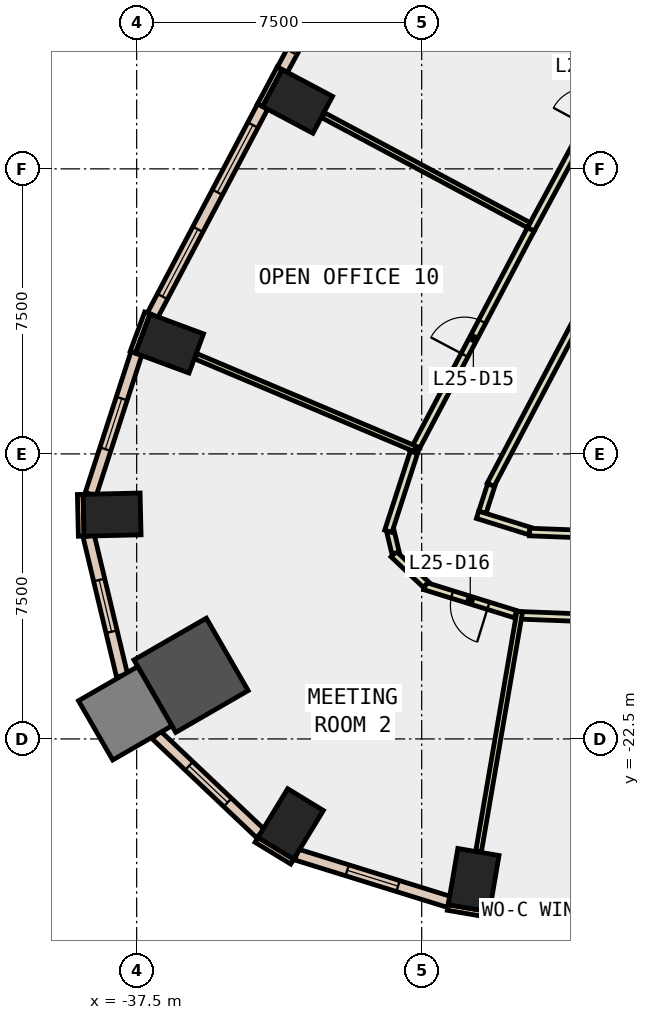
"""IFC4 building model, lengths in metres.
Left out: names, types, materials, properties, quantities, classifications, styles, units other than length and angle.
Written with IfcOpenShell. Run it as: python <this file> out.ifc"""

import sys

from ifc_helpers import new_model, si_unit, direction, frame, frame_2d, origin, origin_2d, place, context, subcontext, project, spatial, rectangle, extrude, element, fill, save


model = new_model("IFC4")
c1 = context("Model", 3, precision=1e-05, world=origin(), true_north=direction((0.0, 1.0)))
c2 = subcontext(c1, "Body", "Model", "MODEL_VIEW")
j1 = project(units=[si_unit("LENGTHUNIT", "METRE"), si_unit("PLANEANGLEUNIT", "RADIAN")], contexts=[c1])
p1 = place(None, origin())
s1 = spatial("IfcSite", under=j1, at=p1, CompositionType="ELEMENT")
p2 = place(p1, origin())
s2 = spatial("IfcBuilding", under=s1, at=p2, CompositionType="ELEMENT")
p3 = place(p2, frame((0.0, 0.0, 116.0)))
s3 = spatial("IfcBuildingStorey", under=s2, at=p3, CompositionType="ELEMENT", Elevation=116.0)
for number, where, z_axis, x_axis in (
    (1, (-28.633, -26.214, -0.4), (0.0, 0.0, 1.0), (-0.986, 0.168, 0.0)),
    (2, (-33.266, -5.726, -0.4), (0.0, 0.0, 1.0), (0.469, 0.883, 0.0)),
    (3, (-36.635, -12.096, -0.4), (0.0, 0.0, 1.0), (0.347, 0.938, 0.0)),
    (4, (-38.147, -16.597, -0.4), (0.0, 0.0, 1.0), (-0.023, 1.0, 0.0)),
):
    element("IfcColumn", number, at=place(p3, frame(where, z_axis=z_axis, x_axis=x_axis)), inside=s3, PredefinedType="COLUMN", context=c2, shape_type="SweptSolid", body=[
        extrude(rectangle(XDim=1.1, YDim=1.5, at=origin_2d()), origin(), (0.0, 0.0, 1.0), 4.2),
    ])
p4 = place(p3, frame((-36.069, -20.825, -0.4), z_axis=(0.0, 0.0, 1.0), x_axis=(0.866025403784, 0.5, 0.0)))
e5 = element("IfcColumn", 5, at=p4, inside=s3, PredefinedType="COLUMN", context=c2, shape_type="SweptSolid", body=[
    extrude(rectangle(XDim=2.2, YDim=2.2, at=origin_2d()), origin(), (0.0, 0.0, 1.0), 4.2),
])
p5 = place(p3, frame((-33.447, -24.737, -0.4), z_axis=(0.0, 0.0, 1.0), x_axis=(-0.854095929175, 0.520115510024, 0.0)))
e6 = element("IfcColumn", 6, at=p5, inside=s3, PredefinedType="COLUMN", context=c2, shape_type="SweptSolid", body=[
    extrude(rectangle(XDim=1.1, YDim=1.5, at=origin_2d()), origin(), (0.0, 0.0, 1.0), 4.2),
])
p6 = place(p3, frame((-37.801, -21.825, -0.4), z_axis=(0.0, 0.0, 1.0), x_axis=(0.866025403784, 0.5, 0.0)))
e7 = element("IfcColumn", 7, at=p6, inside=s3, PredefinedType="COLUMN", context=c2, shape_type="SweptSolid", body=[
    extrude(rectangle(XDim=1.8, YDim=1.8, at=origin_2d()), origin(), (0.0, 0.0, 1.0), 4.2),
])
p7 = place(p3, frame((-33.737, -4.854, 0.0), z_axis=(0.0, 0.0, 1.0), x_axis=(-0.46919310775, -0.883095593716, 0.0)))
e8 = element("IfcWall", 8, at=p7, inside=s3, PredefinedType="STANDARD", context=c2, shape_type="SweptSolid", body=[
    extrude(rectangle(XDim=1.099, YDim=0.15, at=frame_2d((0.55, 0.0))), origin(), (0.0, 0.0, 1.0), 3.8),
])
p8 = place(p3, frame((-37.218, -11.293, 0.0), z_axis=(0.0, 0.0, 1.0), x_axis=(-0.347205967468, -0.937788897436, 0.0)))
e9 = element("IfcWall", 9, at=p8, inside=s3, PredefinedType="STANDARD", context=c2, shape_type="SweptSolid", body=[
    extrude(rectangle(XDim=1.1, YDim=0.15, at=frame_2d((0.55, 0.0))), origin(), (0.0, 0.0, 1.0), 3.8),
])
p9 = place(p3, frame((-29.314, -26.935, 0.0), z_axis=(0.0, 0.0, 1.0), x_axis=(0.985763338892, -0.168138751323, 0.0)))
e10 = element("IfcWall", 10, at=p9, inside=s3, PredefinedType="STANDARD", context=c2, shape_type="SweptSolid", body=[
    extrude(rectangle(XDim=1.101, YDim=0.15, at=frame_2d((0.55, 0.0))), origin(), (0.0, 0.0, 1.0), 3.8),
])
for number, where, z_axis, x_axis in (
    (11, (-38.985, -16.066, 0.0), (0.0, 0.0, 1.0), (0.024, -1.0, 0.0)),
    (12, (-34.346, -25.156, 0.0), (0.0, 0.0, 1.0), (0.854, -0.52, 0.0)),
):
    element("IfcWall", number, at=place(p3, frame(where, z_axis=z_axis, x_axis=x_axis)), inside=s3, PredefinedType="STANDARD", context=c2, shape_type="SweptSolid", body=[
        extrude(rectangle(XDim=1.1, YDim=0.15, at=frame_2d((0.55, 0.0))), origin(), (0.0, 0.0, 1.0), 3.8),
    ])
p10 = place(p3, frame((-28.205, -26.973, 0.0), z_axis=(0.0, 0.0, 1.0), x_axis=(0.999266319694, -0.03829911651, 0.0)))
e13 = element("IfcWall", 13, at=p10, inside=s3, PredefinedType="STANDARD", context=c2, shape_type="SweptSolid", body=[
    extrude(rectangle(XDim=5.877, YDim=0.3, at=frame_2d((2.939, 0.0))), origin(), (0.0, 0.0, 1.0), 3.8),
])
p11 = place(p10, frame((0.469, 0.0, 0.9)))
e14 = element("IfcOpeningElement", 14, at=p11, cuts=e13, PredefinedType="OPENING", context=c2, shape_type="SweptSolid", body=[
    extrude(rectangle(XDim=2.0, YDim=2.6, at=frame_2d((1.0, 1.3))), frame((0.0, 0.16, 0.0), z_axis=(0.0, -1.0, 0.0), x_axis=(1.0, 0.0, 0.0)), (0.0, 0.0, 1.0), 0.32),
])
p12 = place(p10, frame((3.408, 0.0, 0.9)))
e15 = element("IfcOpeningElement", 15, at=p12, cuts=e13, PredefinedType="OPENING", context=c2, shape_type="SweptSolid", body=[
    extrude(rectangle(XDim=2.0, YDim=2.6, at=frame_2d((1.0, 1.3))), frame((0.0, 0.16, 0.0), z_axis=(0.0, -1.0, 0.0), x_axis=(1.0, 0.0, 0.0)), (0.0, 0.0, 1.0), 0.32),
])
p13 = place(p3, frame((-30.758, 0.481, 0.0), z_axis=(0.0, 0.0, 1.0), x_axis=(-0.476097776444, -0.879392351152, 0.0)))
e16 = element("IfcWall", 16, at=p13, inside=s3, PredefinedType="STANDARD", context=c2, shape_type="SweptSolid", body=[
    extrude(rectangle(XDim=6.11, YDim=0.3, at=frame_2d((3.055, 0.0))), origin(), (0.0, 0.0, 1.0), 3.8),
])
p14 = place(p13, frame((0.527, 0.0, 0.9)))
e17 = element("IfcOpeningElement", 17, at=p14, cuts=e16, PredefinedType="OPENING", context=c2, shape_type="SweptSolid", body=[
    extrude(rectangle(XDim=2.0, YDim=2.6, at=frame_2d((1.0, 1.3))), frame((0.0, 0.16, 0.0), z_axis=(0.0, -1.0, 0.0), x_axis=(1.0, 0.0, 0.0)), (0.0, 0.0, 1.0), 0.32),
])
p15 = place(p13, frame((3.582, 0.0, 0.9)))
e18 = element("IfcOpeningElement", 18, at=p15, cuts=e16, PredefinedType="OPENING", context=c2, shape_type="SweptSolid", body=[
    extrude(rectangle(XDim=2.0, YDim=2.6, at=frame_2d((1.0, 1.3))), frame((0.0, 0.16, 0.0), z_axis=(0.0, -1.0, 0.0), x_axis=(1.0, 0.0, 0.0)), (0.0, 0.0, 1.0), 0.32),
])
p16 = place(p3, frame((-34.185, -5.86, 0.0), z_axis=(0.0, 0.0, 1.0), x_axis=(-0.466599547852, -0.88446868907, 0.0)))
e19 = element("IfcWall", 19, at=p16, inside=s3, PredefinedType="STANDARD", context=c2, shape_type="SweptSolid", body=[
    extrude(rectangle(XDim=6.202, YDim=0.3, at=frame_2d((3.101, 0.0))), origin(), (0.0, 0.0, 1.0), 3.8),
])
p17 = place(p16, frame((0.551, 0.0, 0.9)))
e20 = element("IfcOpeningElement", 20, at=p17, cuts=e19, PredefinedType="OPENING", context=c2, shape_type="SweptSolid", body=[
    extrude(rectangle(XDim=2.0, YDim=2.6, at=frame_2d((1.0, 1.3))), frame((0.0, 0.16, 0.0), z_axis=(0.0, -1.0, 0.0), x_axis=(1.0, 0.0, 0.0)), (0.0, 0.0, 1.0), 0.32),
])
p18 = place(p16, frame((3.652, 0.0, 0.9)))
e21 = element("IfcOpeningElement", 21, at=p18, cuts=e19, PredefinedType="OPENING", context=c2, shape_type="SweptSolid", body=[
    extrude(rectangle(XDim=2.0, YDim=2.6, at=frame_2d((1.0, 1.3))), frame((0.0, 0.16, 0.0), z_axis=(0.0, -1.0, 0.0), x_axis=(1.0, 0.0, 0.0)), (0.0, 0.0, 1.0), 0.32),
])
p19 = place(p3, frame((-37.508, -12.358, 0.0), z_axis=(0.0, 0.0, 1.0), x_axis=(-0.308484760821, -0.951229284842, 0.0)))
e22 = element("IfcWall", 22, at=p19, inside=s3, PredefinedType="STANDARD", context=c2, shape_type="SweptSolid", body=[
    extrude(rectangle(XDim=3.893, YDim=0.3, at=frame_2d((1.947, 0.0))), origin(), (0.0, 0.0, 1.0), 3.8),
])
p20 = place(p19, frame((1.246, 0.0, 0.9)))
e23 = element("IfcOpeningElement", 23, at=p20, cuts=e22, PredefinedType="OPENING", context=c2, shape_type="SweptSolid", body=[
    extrude(rectangle(XDim=1.4, YDim=2.6, at=frame_2d((0.7, 1.3))), frame((0.0, 0.16, 0.0), z_axis=(0.0, -1.0, 0.0), x_axis=(1.0, 0.0, 0.0)), (0.0, 0.0, 1.0), 0.32),
])
p21 = place(p3, frame((-38.763, -17.161, 0.0), z_axis=(0.0, 0.0, 1.0), x_axis=(0.232654276823, -0.972559503309, 0.0)))
e24 = element("IfcWall", 24, at=p21, inside=s3, PredefinedType="STANDARD", context=c2, shape_type="SweptSolid", body=[
    extrude(rectangle(XDim=3.778, YDim=0.3, at=frame_2d((1.889, 0.0))), origin(), (0.0, 0.0, 1.0), 3.8),
])
p22 = place(p21, frame((1.189, 0.0, 0.9)))
e25 = element("IfcOpeningElement", 25, at=p22, cuts=e24, PredefinedType="OPENING", context=c2, shape_type="SweptSolid", body=[
    extrude(rectangle(XDim=1.4, YDim=2.6, at=frame_2d((0.7, 1.3))), frame((0.0, 0.16, 0.0), z_axis=(0.0, -1.0, 0.0), x_axis=(1.0, 0.0, 0.0)), (0.0, 0.0, 1.0), 0.32),
])
p23 = place(p3, frame((-36.985, -22.392, 0.0), z_axis=(0.0, 0.0, 1.0), x_axis=(0.726076674532, -0.687613745281, 0.0)))
e26 = element("IfcWall", 26, at=p23, inside=s3, PredefinedType="STANDARD", context=c2, shape_type="SweptSolid", body=[
    extrude(rectangle(XDim=3.777, YDim=0.3, at=frame_2d((1.888, 0.0))), origin(), (0.0, 0.0, 1.0), 3.8),
])
p24 = place(p23, frame((1.188, 0.0, 0.9)))
e27 = element("IfcOpeningElement", 27, at=p24, cuts=e26, PredefinedType="OPENING", context=c2, shape_type="SweptSolid", body=[
    extrude(rectangle(XDim=1.4, YDim=2.6, at=frame_2d((0.7, 1.3))), frame((0.0, 0.16, 0.0), z_axis=(0.0, -1.0, 0.0), x_axis=(1.0, 0.0, 0.0)), (0.0, 0.0, 1.0), 0.32),
])
p25 = place(p3, frame((-33.294, -25.542, 0.0), z_axis=(0.0, 0.0, 1.0), x_axis=(0.954955020021, -0.296750585066, 0.0)))
e28 = element("IfcWall", 28, at=p25, inside=s3, PredefinedType="STANDARD", context=c2, shape_type="SweptSolid", body=[
    extrude(rectangle(XDim=4.196, YDim=0.3, at=frame_2d((2.098, 0.0))), origin(), (0.0, 0.0, 1.0), 3.8),
])
p26 = place(p25, frame((1.398, 0.0, 0.9)))
e29 = element("IfcOpeningElement", 29, at=p26, cuts=e28, PredefinedType="OPENING", context=c2, shape_type="SweptSolid", body=[
    extrude(rectangle(XDim=1.4, YDim=2.6, at=frame_2d((0.7, 1.3))), frame((0.0, 0.16, 0.0), z_axis=(0.0, -1.0, 0.0), x_axis=(1.0, 0.0, 0.0)), (0.0, 0.0, 1.0), 0.32),
])
p27 = place(p3, frame((-25.153, -10.065, 0.0), z_axis=(0.0, 0.0, 1.0), x_axis=(-0.466663976618, -0.884434696813, 0.0)))
e30 = element("IfcWall", 30, at=p27, inside=s3, PredefinedType="PARTITIONING", context=c2, shape_type="SweptSolid", body=[
    extrude(rectangle(XDim=6.501, YDim=0.2, at=frame_2d((3.25, 0.0))), origin(), (0.0, 0.0, 1.0), 3.8),
])
p28 = place(p3, frame((-28.171, -15.821, 0.0), z_axis=(0.0, 0.0, 1.0), x_axis=(-0.308053137273, -0.951369152651, 0.0)))
e31 = element("IfcWall", 31, at=p28, inside=s3, PredefinedType="PARTITIONING", context=c2, shape_type="SweptSolid", body=[
    extrude(rectangle(XDim=0.754, YDim=0.2, at=frame_2d((0.377, 0.0))), origin(), (0.0, 0.0, 1.0), 3.8),
])
p29 = place(p3, frame((-28.529, -16.603, 0.0), z_axis=(0.0, 0.0, 1.0), x_axis=(0.954829998701, -0.297152609916, 0.0)))
e32 = element("IfcWall", 32, at=p29, inside=s3, PredefinedType="PARTITIONING", context=c2, shape_type="SweptSolid", body=[
    extrude(rectangle(XDim=1.437, YDim=0.2, at=frame_2d((0.719, 0.0))), origin(), (0.0, 0.0, 1.0), 3.8),
])
p30 = place(p3, frame((-27.162, -17.056, 0.0), z_axis=(0.0, 0.0, 1.0), x_axis=(0.999270868304, -0.038180253525, 0.0)))
e33 = element("IfcWall", 33, at=p30, inside=s3, PredefinedType="PARTITIONING", context=c2, shape_type="SweptSolid", body=[
    extrude(rectangle(XDim=5.71, YDim=0.2, at=frame_2d((2.855, 0.0))), origin(), (0.0, 0.0, 1.0), 3.8),
])
p31 = place(p3, frame((-27.129, -9.094, 0.0), z_axis=(0.0, 0.0, 1.0), x_axis=(0.476090835435, 0.879396108938, 0.0)))
e34 = element("IfcWall", 34, at=p31, inside=s3, PredefinedType="PARTITIONING", context=c2, shape_type="SweptSolid", body=[
    extrude(rectangle(XDim=7.198, YDim=0.2, at=frame_2d((3.599, 0.0))), origin(), (0.0, 0.0, 1.0), 3.8),
])
p32 = place(p31, frame((3.099, 0.0, 0.0)))
e35 = element("IfcOpeningElement", 35, at=p32, cuts=e34, PredefinedType="OPENING", context=c2, shape_type="SweptSolid", body=[
    extrude(rectangle(XDim=1.0, YDim=2.1, at=frame_2d((0.5, 1.05))), frame((0.0, 0.11, 0.0), z_axis=(0.0, -1.0, 0.0), x_axis=(1.0, 0.0, 0.0)), (0.0, 0.0, 1.0), 0.22),
])
p33 = place(p3, frame((-30.221, -14.956, 0.0), z_axis=(0.0, 0.0, 1.0), x_axis=(0.466543318111, 0.884498350663, 0.0)))
e36 = element("IfcWall", 36, at=p33, inside=s3, PredefinedType="PARTITIONING", context=c2, shape_type="SweptSolid", body=[
    extrude(rectangle(XDim=6.627, YDim=0.2, at=frame_2d((3.314, 0.0))), origin(), (0.0, 0.0, 1.0), 3.8),
])
p34 = place(p33, frame((2.889, 0.0, 0.0)))
e37 = element("IfcOpeningElement", 37, at=p34, cuts=e36, PredefinedType="OPENING", context=c2, shape_type="SweptSolid", body=[
    extrude(rectangle(XDim=1.0, YDim=2.1, at=frame_2d((0.5, 1.05))), frame((0.0, 0.11, 0.0), z_axis=(0.0, -1.0, 0.0), x_axis=(1.0, 0.0, 0.0)), (0.0, 0.0, 1.0), 0.22),
])
p35 = place(p3, frame((-27.533, -19.217, 0.0), z_axis=(0.0, 0.0, 1.0), x_axis=(-0.954946345159, 0.296778499671, 0.0)))
e38 = element("IfcWall", 38, at=p35, inside=s3, PredefinedType="PARTITIONING", context=c2, shape_type="SweptSolid", body=[
    extrude(rectangle(XDim=2.49, YDim=0.2, at=frame_2d((1.245, 0.0))), origin(), (0.0, 0.0, 1.0), 3.8),
])
p36 = place(p35, frame((0.745, 0.0, 0.0)))
e39 = element("IfcOpeningElement", 39, at=p36, cuts=e38, PredefinedType="OPENING", context=c2, shape_type="SweptSolid", body=[
    extrude(rectangle(XDim=1.0, YDim=2.1, at=frame_2d((0.5, 1.05))), frame((0.0, 0.11, 0.0), z_axis=(0.0, -1.0, 0.0), x_axis=(1.0, 0.0, 0.0)), (0.0, 0.0, 1.0), 0.22),
])
p37 = place(p3, frame((-29.888, -18.439, 0.0), z_axis=(0.0, 0.0, 1.0), x_axis=(-0.726155646563, 0.687530346214, 0.0)))
e40 = element("IfcWall", 40, at=p37, inside=s3, PredefinedType="PARTITIONING", context=c2, shape_type="SweptSolid", body=[
    extrude(rectangle(XDim=1.169, YDim=0.2, at=frame_2d((0.585, 0.0))), origin(), (0.0, 0.0, 1.0), 3.8),
])
p38 = place(p3, frame((-30.687, -17.607, 0.0), z_axis=(0.0, 0.0, 1.0), x_axis=(-0.232504544059, 0.972595309978, 0.0)))
e41 = element("IfcWall", 41, at=p38, inside=s3, PredefinedType="PARTITIONING", context=c2, shape_type="SweptSolid", body=[
    extrude(rectangle(XDim=0.585, YDim=0.2, at=frame_2d((0.292, 0.0))), origin(), (0.0, 0.0, 1.0), 3.8),
])
p39 = place(p3, frame((-30.878, -17.036, 0.0), z_axis=(0.0, 0.0, 1.0), x_axis=(0.308592319841, 0.951194396606, 0.0)))
e42 = element("IfcWall", 42, at=p39, inside=s3, PredefinedType="PARTITIONING", context=c2, shape_type="SweptSolid", body=[
    extrude(rectangle(XDim=2.18, YDim=0.2, at=frame_2d((1.09, 0.0))), origin(), (0.0, 0.0, 1.0), 3.8),
])
p40 = place(p3, frame((-21.529, -19.473, 0.0), z_axis=(0.0, 0.0, 1.0), x_axis=(-0.999270076349, 0.038200975307, 0.0)))
e43 = element("IfcWall", 43, at=p40, inside=s3, PredefinedType="PARTITIONING", context=c2, shape_type="SweptSolid", body=[
    extrude(rectangle(XDim=5.937, YDim=0.2, at=frame_2d((2.969, 0.0))), origin(), (0.0, 0.0, 1.0), 3.8),
])
p41 = place(p40, frame((2.469, 0.0, 0.0)))
e44 = element("IfcOpeningElement", 44, at=p41, cuts=e43, PredefinedType="OPENING", context=c2, shape_type="SweptSolid", body=[
    extrude(rectangle(XDim=1.0, YDim=2.1, at=frame_2d((0.5, 1.05))), frame((0.0, 0.11, 0.0), z_axis=(0.0, -1.0, 0.0), x_axis=(1.0, 0.0, 0.0)), (0.0, 0.0, 1.0), 0.22),
])
p42 = place(p3, frame((-27.182, -8.981, 0.0), z_axis=(0.0, 0.0, 1.0), x_axis=(-0.881899408669, 0.471437623647, 0.0)))
e45 = element("IfcWall", 45, at=p42, inside=s3, PredefinedType="PARTITIONING", context=c2, shape_type="SweptSolid", body=[
    extrude(rectangle(XDim=6.13, YDim=0.15, at=frame_2d((3.065, 0.0))), origin(), (0.0, 0.0, 1.0), 3.8),
])
p43 = place(p3, frame((-30.174, -14.867, 0.0), z_axis=(0.0, 0.0, 1.0), x_axis=(-0.921262609517, 0.388941132185, 0.0)))
e46 = element("IfcWall", 46, at=p43, inside=s3, PredefinedType="PARTITIONING", context=c2, shape_type="SweptSolid", body=[
    extrude(rectangle(XDim=6.258, YDim=0.15, at=frame_2d((3.129, 0.0))), origin(), (0.0, 0.0, 1.0), 3.8),
])
p44 = place(p3, frame((-27.42, -19.148, 0.0), z_axis=(0.0, 0.0, 1.0), x_axis=(-0.169086648341, -0.985601189809, 0.0)))
e47 = element("IfcWall", 47, at=p44, inside=s3, PredefinedType="PARTITIONING", context=c2, shape_type="SweptSolid", body=[
    extrude(rectangle(XDim=6.399, YDim=0.15, at=frame_2d((3.2, 0.0))), origin(), (0.0, 0.0, 1.0), 3.8),
])
p45 = place(p11, origin())
e48 = element("IfcWindow", 48, at=p45, inside=s3, PartitioningType="SINGLE_PANEL", PredefinedType="WINDOW", context=c2, shape_type="SweptSolid", body=[
    extrude(rectangle(XDim=2.0, YDim=2.6, at=frame_2d((1.0, 1.3))), frame((0.0, 0.03, 0.0), z_axis=(0.0, -1.0, 0.0), x_axis=(1.0, 0.0, 0.0)), (0.0, 0.0, 1.0), 0.06),
])
fill(e14, e48)
p46 = place(p17, origin())
e49 = element("IfcWindow", 49, at=p46, inside=s3, PartitioningType="SINGLE_PANEL", PredefinedType="WINDOW", context=c2, shape_type="SweptSolid", body=[
    extrude(rectangle(XDim=2.0, YDim=2.6, at=frame_2d((1.0, 1.3))), frame((0.0, 0.03, 0.0), z_axis=(0.0, -1.0, 0.0), x_axis=(1.0, 0.0, 0.0)), (0.0, 0.0, 1.0), 0.06),
])
fill(e20, e49)
p47 = place(p18, origin())
e50 = element("IfcWindow", 50, at=p47, inside=s3, PartitioningType="SINGLE_PANEL", PredefinedType="WINDOW", context=c2, shape_type="SweptSolid", body=[
    extrude(rectangle(XDim=2.0, YDim=2.6, at=frame_2d((1.0, 1.3))), frame((0.0, 0.03, 0.0), z_axis=(0.0, -1.0, 0.0), x_axis=(1.0, 0.0, 0.0)), (0.0, 0.0, 1.0), 0.06),
])
fill(e21, e50)
p48 = place(p20, origin())
e51 = element("IfcWindow", 51, at=p48, inside=s3, PartitioningType="SINGLE_PANEL", PredefinedType="WINDOW", context=c2, shape_type="SweptSolid", body=[
    extrude(rectangle(XDim=1.4, YDim=2.6, at=frame_2d((0.7, 1.3))), frame((0.0, 0.03, 0.0), z_axis=(0.0, -1.0, 0.0), x_axis=(1.0, 0.0, 0.0)), (0.0, 0.0, 1.0), 0.06),
])
fill(e23, e51)
p49 = place(p22, origin())
e52 = element("IfcWindow", 52, at=p49, inside=s3, PartitioningType="SINGLE_PANEL", PredefinedType="WINDOW", context=c2, shape_type="SweptSolid", body=[
    extrude(rectangle(XDim=1.4, YDim=2.6, at=frame_2d((0.7, 1.3))), frame((0.0, 0.03, 0.0), z_axis=(0.0, -1.0, 0.0), x_axis=(1.0, 0.0, 0.0)), (0.0, 0.0, 1.0), 0.06),
])
fill(e25, e52)
p50 = place(p24, origin())
e53 = element("IfcWindow", 53, at=p50, inside=s3, PartitioningType="SINGLE_PANEL", PredefinedType="WINDOW", context=c2, shape_type="SweptSolid", body=[
    extrude(rectangle(XDim=1.4, YDim=2.6, at=frame_2d((0.7, 1.3))), frame((0.0, 0.03, 0.0), z_axis=(0.0, -1.0, 0.0), x_axis=(1.0, 0.0, 0.0)), (0.0, 0.0, 1.0), 0.06),
])
fill(e27, e53)
p51 = place(p26, origin())
e54 = element("IfcWindow", 54, at=p51, inside=s3, PartitioningType="SINGLE_PANEL", PredefinedType="WINDOW", context=c2, shape_type="SweptSolid", body=[
    extrude(rectangle(XDim=1.4, YDim=2.6, at=frame_2d((0.7, 1.3))), frame((0.0, 0.03, 0.0), z_axis=(0.0, -1.0, 0.0), x_axis=(1.0, 0.0, 0.0)), (0.0, 0.0, 1.0), 0.06),
])
fill(e29, e54)
p52 = place(p34, origin())
e55 = element("IfcDoor", 55, at=p52, inside=s3, OperationType="SINGLE_SWING_LEFT", PredefinedType="DOOR", context=c2, shape_type="SweptSolid", body=[
    extrude(rectangle(XDim=1.0, YDim=2.1, at=frame_2d((0.5, 1.05))), frame((0.0, 0.025, 0.0), z_axis=(0.0, -1.0, 0.0), x_axis=(1.0, 0.0, 0.0)), (0.0, 0.0, 1.0), 0.05),
])
fill(e37, e55)
p53 = place(p36, origin())
e56 = element("IfcDoor", 56, at=p53, inside=s3, OperationType="SINGLE_SWING_LEFT", PredefinedType="DOOR", context=c2, shape_type="SweptSolid", body=[
    extrude(rectangle(XDim=1.0, YDim=2.1, at=frame_2d((0.5, 1.05))), frame((0.0, 0.025, 0.0), z_axis=(0.0, -1.0, 0.0), x_axis=(1.0, 0.0, 0.0)), (0.0, 0.0, 1.0), 0.05),
])
fill(e39, e56)
save(model, sys.argv[1])
